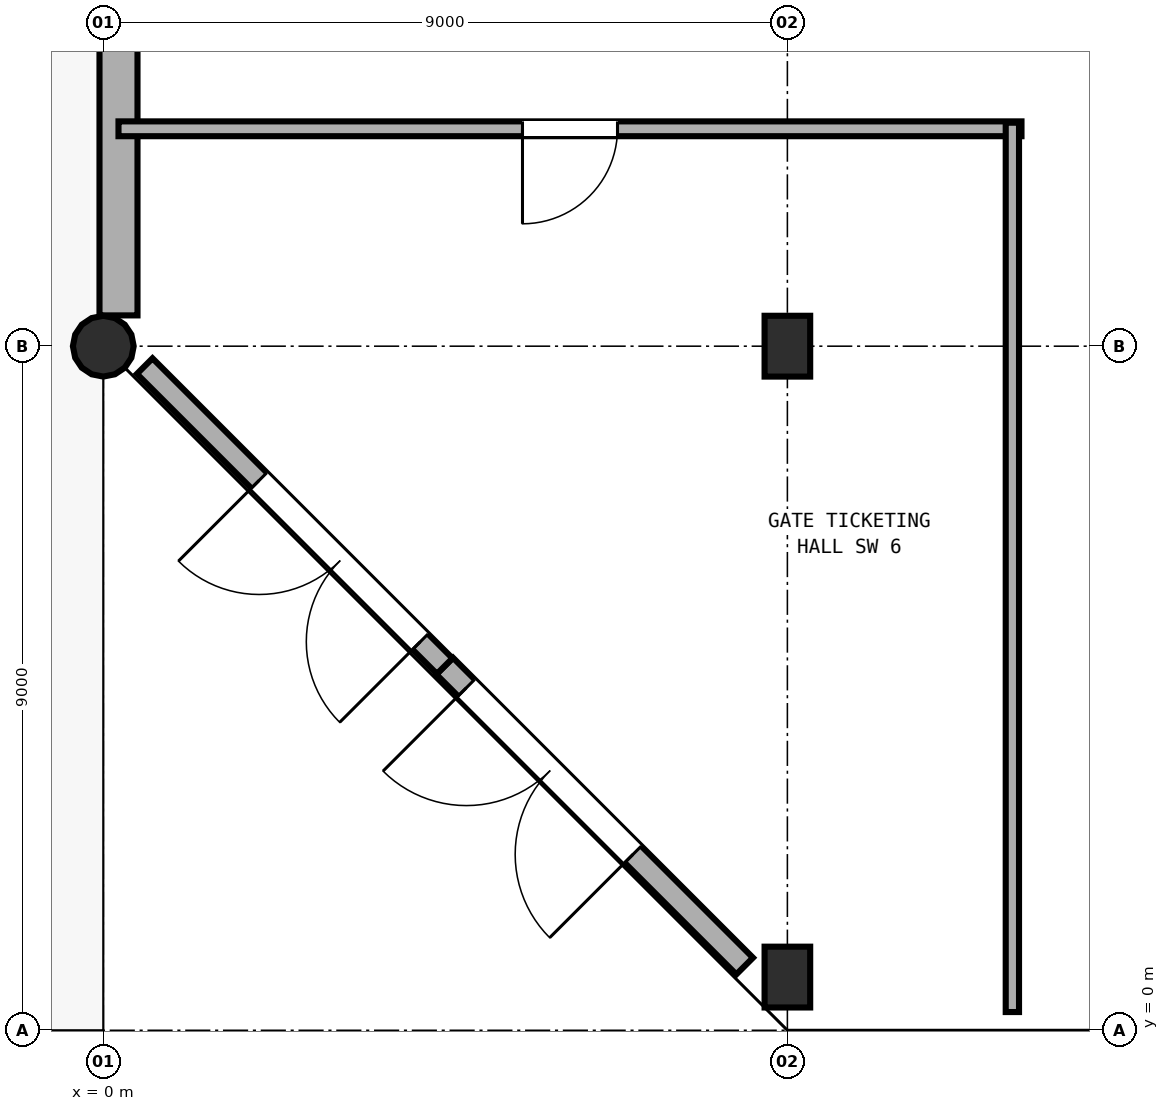
"""IFC4 building model, lengths in metres.
Left out: names, types, materials, properties, quantities, classifications, styles, units other than length and angle.
Written with IfcOpenShell. Run it as: python <this file> out.ifc"""

import sys

from ifc_helpers import new_model, si_unit, direction, frame, frame_2d, origin, origin_2d, place, context, subcontext, project, spatial, rectangle, circle, extrude, element, fill, save


model = new_model("IFC4")
c1 = context("Model", 3, precision=1e-05, world=origin(), true_north=direction((0.0, 1.0)))
c2 = subcontext(c1, "Body", "Model", "MODEL_VIEW")
j1 = project(units=[si_unit("LENGTHUNIT", "METRE"), si_unit("PLANEANGLEUNIT", "RADIAN")], contexts=[c1])
p1 = place(None, origin())
s1 = spatial("IfcSite", under=j1, at=p1, CompositionType="ELEMENT")
p2 = place(p1, origin())
s2 = spatial("IfcBuilding", under=s1, at=p2, CompositionType="ELEMENT")
p3 = place(p2, origin())
s3 = spatial("IfcBuildingStorey", under=s2, at=p3, CompositionType="ELEMENT", Elevation=0.0)
p4 = place(p3, frame((0.0, 9.0, 0.0), z_axis=(0.0, 0.0, 1.0), x_axis=(1.0, 0.0, 0.0)))
e1 = element("IfcColumn", 1, at=p4, inside=s3, PredefinedType="COLUMN", context=c2, shape_type="SweptSolid", body=[
    extrude(circle(Radius=0.4, at=origin_2d()), origin(), (0.0, 0.0, 1.0), 4.8),
])
for number, where, z_axis, x_axis in (
    (2, (9.0, 0.7, 0.0), (0.0, 0.0, 1.0), (1.0, 0.0, 0.0)),
    (3, (9.0, 9.0, 0.0), (0.0, 0.0, 1.0), (1.0, 0.0, 0.0)),
):
    element("IfcColumn", number, at=place(p3, frame(where, z_axis=z_axis, x_axis=x_axis)), inside=s3, PredefinedType="COLUMN", context=c2, shape_type="SweptSolid", body=[
        extrude(rectangle(XDim=0.6, YDim=0.8, at=origin_2d()), origin(), (0.0, 0.0, 1.0), 4.8),
    ])
p5 = place(p3, frame((8.438, 0.845, 0.0), z_axis=(0.0, 0.0, 1.0), x_axis=(-0.7071067811865476, 0.7071067811865476, 0.0)))
e4 = element("IfcWall", 4, at=p5, inside=s3, PredefinedType="SOLIDWALL", context=c2, shape_type="SweptSolid", body=[
    extrude(rectangle(XDim=5.581, YDim=0.31, at=frame_2d((2.791, 0.0))), origin(), (0.0, 0.0, 1.0), 3.58),
])
p6 = place(p5, frame((2.078, 0.0, 0.0)))
e5 = element("IfcOpeningElement", 5, at=p6, cuts=e4, PredefinedType="OPENING", context=c2, shape_type="SweptSolid", body=[
    extrude(rectangle(XDim=3.1, YDim=2.5, at=frame_2d((1.55, 1.25))), frame((0.0, 0.165, 0.0), z_axis=(0.0, -1.0, 0.0), x_axis=(1.0, 0.0, 0.0)), (0.0, 0.0, 1.0), 0.33),
])
p7 = place(p3, frame((4.491, 4.792, 0.0), z_axis=(0.0, 0.0, 1.0), x_axis=(-0.7071286530614815, 0.7070849086350626, 0.0)))
e6 = element("IfcWall", 6, at=p7, inside=s3, PredefinedType="SOLIDWALL", context=c2, shape_type="SweptSolid", body=[
    extrude(rectangle(XDim=5.581, YDim=0.29, at=frame_2d((2.791, 0.0))), origin(), (0.0, 0.0, 1.0), 3.58),
])
p8 = place(p7, frame((0.453, 0.0, 0.0)))
e7 = element("IfcOpeningElement", 7, at=p8, cuts=e6, PredefinedType="OPENING", context=c2, shape_type="SweptSolid", body=[
    extrude(rectangle(XDim=3.0, YDim=2.45, at=frame_2d((1.5, 1.225))), frame((0.0, 0.155, 0.0), z_axis=(0.0, -1.0, 0.0), x_axis=(1.0, 0.0, 0.0)), (0.0, 0.0, 1.0), 0.31),
])
p9 = place(p3, frame((0.2, 9.405, 0.0), z_axis=(0.0, 0.0, 1.0), x_axis=(0.0, 1.0, 0.0)))
e8 = element("IfcWall", 8, at=p9, inside=s3, PredefinedType="SOLIDWALL", context=c2, shape_type="SweptSolid", body=[
    extrude(rectangle(XDim=8.19, YDim=0.5, at=frame_2d((4.095, 0.0))), origin(), (0.0, 0.0, 1.0), 3.58),
])
p10 = place(p3, frame((17.695, 0.2, 0.0), z_axis=(0.0, 0.0, 1.0), x_axis=(-1.0, 0.0, 0.0)))
e9 = element("IfcWall", 9, at=p10, inside=s3, PredefinedType="SOLIDWALL", context=c2, shape_type="SweptSolid", body=[
    extrude(rectangle(XDim=8.39, YDim=0.48, at=frame_2d((4.195, 0.0))), origin(), (0.0, 0.0, 1.0), 3.58),
])
p11 = place(p3, frame((12.08, 11.86, 0.0), z_axis=(0.0, 0.0, 1.0), x_axis=(-1.0, 0.0, 0.0)))
e10 = element("IfcWall", 10, at=p11, inside=s3, PredefinedType="PARTITIONING", context=c2, shape_type="SweptSolid", body=[
    extrude(rectangle(XDim=11.88, YDim=0.195, at=frame_2d((5.94, 0.0))), origin(), (0.0, 0.0, 1.0), 3.28),
])
p12 = place(p11, frame((5.315, 0.0, 0.0)))
e11 = element("IfcOpeningElement", 11, at=p12, cuts=e10, PredefinedType="OPENING", context=c2, shape_type="SweptSolid", body=[
    extrude(rectangle(XDim=1.25, YDim=2.15, at=frame_2d((0.625, 1.075))), frame((0.0, 0.107, 0.0), z_axis=(0.0, -1.0, 0.0), x_axis=(1.0, 0.0, 0.0)), (0.0, 0.0, 1.0), 0.215),
])
p13 = place(p3, frame((11.96, 11.94, 0.0), z_axis=(0.0, 0.0, 1.0), x_axis=(0.0, -1.0, 0.0)))
e12 = element("IfcWall", 12, at=p13, inside=s3, PredefinedType="PARTITIONING", context=c2, shape_type="SweptSolid", body=[
    extrude(rectangle(XDim=11.7, YDim=0.175, at=frame_2d((5.85, 0.0))), origin(), (0.0, 0.0, 1.0), 3.28),
])
p14 = place(p6, origin())
e13 = element("IfcDoor", 13, at=p14, inside=s3, OperationType="DOUBLE_DOOR_SINGLE_SWING", PredefinedType="DOOR", context=c2, shape_type="SweptSolid", body=[
    extrude(rectangle(XDim=3.1, YDim=2.5, at=frame_2d((1.55, 1.25))), frame((0.0, 0.025, 0.0), z_axis=(0.0, -1.0, 0.0), x_axis=(1.0, 0.0, 0.0)), (0.0, 0.0, 1.0), 0.05),
])
fill(e5, e13)
p15 = place(p8, origin())
e14 = element("IfcDoor", 14, at=p15, inside=s3, OperationType="DOUBLE_DOOR_SINGLE_SWING", PredefinedType="DOOR", context=c2, shape_type="SweptSolid", body=[
    extrude(rectangle(XDim=3.0, YDim=2.45, at=frame_2d((1.5, 1.225))), frame((0.0, 0.025, 0.0), z_axis=(0.0, -1.0, 0.0), x_axis=(1.0, 0.0, 0.0)), (0.0, 0.0, 1.0), 0.05),
])
fill(e7, e14)
p16 = place(p12, origin())
e15 = element("IfcDoor", 15, at=p16, inside=s3, OperationType="SINGLE_SWING_RIGHT", PredefinedType="DOOR", context=c2, shape_type="SweptSolid", body=[
    extrude(rectangle(XDim=1.25, YDim=2.15, at=frame_2d((0.625, 1.075))), frame((0.0, 0.025, 0.0), z_axis=(0.0, -1.0, 0.0), x_axis=(1.0, 0.0, 0.0)), (0.0, 0.0, 1.0), 0.05),
])
fill(e11, e15)
save(model, sys.argv[1])
